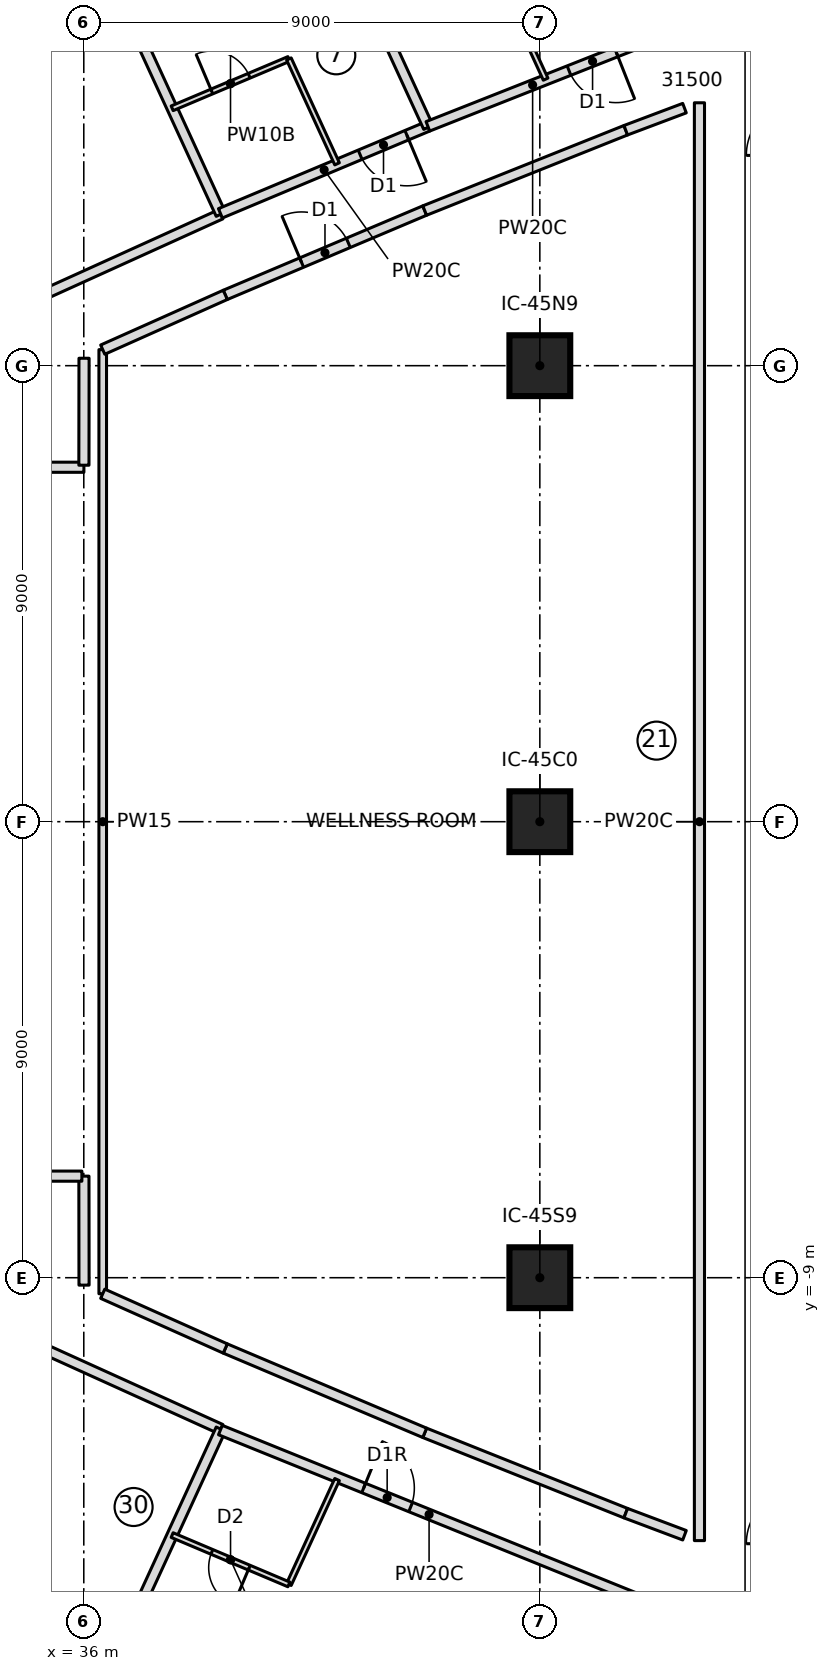
"""IFC4 building model, lengths in metres.
Left out: names, types, materials, properties, quantities, classifications, styles, units other than length and angle.
Written with IfcOpenShell. Run it as: python <this file> out.ifc"""

import sys

from ifc_helpers import new_model, si_unit, direction, frame, frame_2d, origin, origin_2d, place, context, subcontext, project, spatial, rectangle, extrude, element, fill, save


model = new_model("IFC4")
c1 = context("Model", 3, precision=1e-05, world=origin(), true_north=direction((0.0, 1.0)))
c2 = subcontext(c1, "Body", "Model", "MODEL_VIEW")
j1 = project(units=[si_unit("LENGTHUNIT", "METRE"), si_unit("PLANEANGLEUNIT", "RADIAN")], contexts=[c1])
p1 = place(None, origin())
s1 = spatial("IfcSite", under=j1, at=p1, CompositionType="ELEMENT")
p2 = place(p1, origin())
s2 = spatial("IfcBuilding", under=s1, at=p2, CompositionType="ELEMENT")
p3 = place(p2, frame((0.0, 0.0, 99.1)))
s3 = spatial("IfcBuildingStorey", under=s2, at=p3, CompositionType="ELEMENT", Elevation=99.1)
for number, where, z_axis, x_axis in (
    (1, (45.0, -9.0, 0.0), (0.0, 0.0, 1.0), (1.0, 0.0, 0.0)),
    (2, (45.0, 0.0, 0.0), (0.0, 0.0, 1.0), (1.0, 0.0, 0.0)),
    (3, (45.0, 9.0, 0.0), (0.0, 0.0, 1.0), (1.0, 0.0, 0.0)),
):
    element("IfcColumn", number, at=place(p3, frame(where, z_axis=z_axis, x_axis=x_axis)), inside=s3, PredefinedType="COLUMN", context=c2, shape_type="SweptSolid", body=[
        extrude(rectangle(XDim=1.2, YDim=1.2, at=origin_2d()), origin(), (0.0, 0.0, 1.0), 3.55),
    ])
p4 = place(p3, frame((30.614, 8.32, 0.0), z_axis=(0.0, 0.0, 1.0), x_axis=(0.910751030363, 0.41295588226, 0.0)))
e4 = element("IfcWall", 4, at=p4, inside=s3, PredefinedType="PARTITIONING", context=c2, shape_type="SweptSolid", body=[
    extrude(rectangle(XDim=8.883, YDim=0.2, at=frame_2d((4.442, 0.0))), origin(), (0.0, 0.0, 1.0), 3.25),
])
p5 = place(p4, frame((0.45, 0.0, 0.0)))
e5 = element("IfcOpeningElement", 5, at=p5, cuts=e4, PredefinedType="OPENING", context=c2, shape_type="SweptSolid", body=[
    extrude(rectangle(XDim=1.0, YDim=2.1, at=frame_2d((0.5, 1.05))), frame((0.0, 0.11, 0.0), z_axis=(0.0, -1.0, 0.0), x_axis=(1.0, 0.0, 0.0)), (0.0, 0.0, 1.0), 0.22),
])
p6 = place(p3, frame((38.704, 11.989, 0.0), z_axis=(0.0, 0.0, 1.0), x_axis=(-0.417416334044, 0.908715359215, 0.0)))
e6 = element("IfcWall", 6, at=p6, inside=s3, PredefinedType="PARTITIONING", context=c2, shape_type="SweptSolid", body=[
    extrude(rectangle(XDim=7.604, YDim=0.2, at=frame_2d((3.802, 0.0))), origin(), (0.0, 0.0, 1.0), 3.25),
])
p7 = place(p3, frame((42.791, 13.724, 0.0), z_axis=(0.0, 0.0, 1.0), x_axis=(-0.922230433067, -0.386640696675, 0.0)))
e7 = element("IfcWall", 7, at=p7, inside=s3, PredefinedType="PARTITIONING", context=c2, shape_type="SweptSolid", body=[
    extrude(rectangle(XDim=4.44, YDim=0.2, at=frame_2d((2.22, 0.0))), origin(), (0.0, 0.0, 1.0), 3.25),
])
p8 = place(p7, frame((0.45, 0.0, 0.0)))
e8 = element("IfcOpeningElement", 8, at=p8, cuts=e7, PredefinedType="OPENING", context=c2, shape_type="SweptSolid", body=[
    extrude(rectangle(XDim=1.0, YDim=2.1, at=frame_2d((0.5, 1.05))), frame((0.0, 0.11, 0.0), z_axis=(0.0, -1.0, 0.0), x_axis=(1.0, 0.0, 0.0)), (0.0, 0.0, 1.0), 0.22),
])
p9 = place(p3, frame((37.744, 14.08, 0.0), z_axis=(0.0, 0.0, 1.0), x_axis=(0.921042675983, 0.38946166566, 0.0)))
e9 = element("IfcWall", 9, at=p9, inside=s3, PredefinedType="PARTITIONING", context=c2, shape_type="SweptSolid", body=[
    extrude(rectangle(XDim=2.501, YDim=0.1, at=frame_2d((1.25, 0.0))), origin(), (0.0, 0.0, 1.0), 3.25),
])
p10 = place(p9, frame((0.85, 0.0, 0.0)))
e10 = element("IfcOpeningElement", 10, at=p10, cuts=e9, PredefinedType="OPENING", context=c2, shape_type="SweptSolid", body=[
    extrude(rectangle(XDim=0.8, YDim=2.1, at=frame_2d((0.4, 1.05))), frame((0.0, 0.06, 0.0), z_axis=(0.0, -1.0, 0.0), x_axis=(1.0, 0.0, 0.0)), (0.0, 0.0, 1.0), 0.12),
])
p11 = place(p3, frame((40.048, 15.054, 0.0), z_axis=(0.0, 0.0, 1.0), x_axis=(0.417433204355, -0.908707609686, 0.0)))
e11 = element("IfcWall", 11, at=p11, inside=s3, PredefinedType="PARTITIONING", context=c2, shape_type="SweptSolid", body=[
    extrude(rectangle(XDim=2.278, YDim=0.1, at=frame_2d((1.139, 0.0))), origin(), (0.0, 0.0, 1.0), 3.25),
])
p12 = place(p3, frame((42.799, 13.705, 0.0), z_axis=(0.0, 0.0, 1.0), x_axis=(-0.417427858403, 0.908710065438, 0.0)))
e12 = element("IfcWall", 12, at=p12, inside=s3, PredefinedType="PARTITIONING", context=c2, shape_type="SweptSolid", body=[
    extrude(rectangle(XDim=7.61, YDim=0.2, at=frame_2d((3.805, 0.0))), origin(), (0.0, 0.0, 1.0), 3.25),
])
p13 = place(p3, frame((46.924, 15.357, 0.0), z_axis=(0.0, 0.0, 1.0), x_axis=(-0.930040633249, -0.367456692014, 0.0)))
e13 = element("IfcWall", 13, at=p13, inside=s3, PredefinedType="PARTITIONING", context=c2, shape_type="SweptSolid", body=[
    extrude(rectangle(XDim=4.444, YDim=0.2, at=frame_2d((2.222, 0.0))), origin(), (0.0, 0.0, 1.0), 3.25),
])
p14 = place(p13, frame((0.45, 0.0, 0.0)))
e14 = element("IfcOpeningElement", 14, at=p14, cuts=e13, PredefinedType="OPENING", context=c2, shape_type="SweptSolid", body=[
    extrude(rectangle(XDim=1.0, YDim=2.1, at=frame_2d((0.5, 1.05))), frame((0.0, 0.11, 0.0), z_axis=(0.0, -1.0, 0.0), x_axis=(1.0, 0.0, 0.0)), (0.0, 0.0, 1.0), 0.22),
])
p15 = place(p3, frame((44.163, 16.727, 0.0), z_axis=(0.0, 0.0, 1.0), x_axis=(0.417373525971, -0.908735021785, 0.0)))
e15 = element("IfcWall", 15, at=p15, inside=s3, PredefinedType="PARTITIONING", context=c2, shape_type="SweptSolid", body=[
    extrude(rectangle(XDim=2.28, YDim=0.1, at=frame_2d((1.14, 0.0))), origin(), (0.0, 0.0, 1.0), 3.25),
])
p16 = place(p3, frame((30.614, -8.32, 0.0), z_axis=(0.0, 0.0, 1.0), x_axis=(0.910751030363, -0.41295588226, 0.0)))
e16 = element("IfcWall", 16, at=p16, inside=s3, PredefinedType="PARTITIONING", context=c2, shape_type="SweptSolid", body=[
    extrude(rectangle(XDim=8.883, YDim=0.2, at=frame_2d((4.442, 0.0))), origin(), (0.0, 0.0, 1.0), 3.25),
])
p17 = place(p16, frame((0.45, 0.0, 0.0)))
e17 = element("IfcOpeningElement", 17, at=p17, cuts=e16, PredefinedType="OPENING", context=c2, shape_type="SweptSolid", body=[
    extrude(rectangle(XDim=1.0, YDim=2.1, at=frame_2d((0.5, 1.05))), frame((0.0, 0.11, 0.0), z_axis=(0.0, -1.0, 0.0), x_axis=(1.0, 0.0, 0.0)), (0.0, 0.0, 1.0), 0.22),
])
p18 = place(p3, frame((35.531, -18.898, 0.0), z_axis=(0.0, 0.0, 1.0), x_axis=(0.417416334044, 0.908715359215, 0.0)))
e18 = element("IfcWall", 18, at=p18, inside=s3, PredefinedType="PARTITIONING", context=c2, shape_type="SweptSolid", body=[
    extrude(rectangle(XDim=7.604, YDim=0.2, at=frame_2d((3.802, 0.0))), origin(), (0.0, 0.0, 1.0), 3.25),
])
p19 = place(p3, frame((38.696, -12.007, 0.0), z_axis=(0.0, 0.0, 1.0), x_axis=(0.927027566285, -0.374993188401, 0.0)))
e19 = element("IfcWall", 19, at=p19, inside=s3, PredefinedType="PARTITIONING", context=c2, shape_type="SweptSolid", body=[
    extrude(rectangle(XDim=8.885, YDim=0.2, at=frame_2d((4.442, 0.0))), origin(), (0.0, 0.0, 1.0), 3.25),
])
p20 = place(p19, frame((3.05, 0.0, 0.0)))
e20 = element("IfcOpeningElement", 20, at=p20, cuts=e19, PredefinedType="OPENING", context=c2, shape_type="SweptSolid", body=[
    extrude(rectangle(XDim=1.0, YDim=2.1, at=frame_2d((0.5, 1.05))), frame((0.0, 0.11, 0.0), z_axis=(0.0, -1.0, 0.0), x_axis=(1.0, 0.0, 0.0)), (0.0, 0.0, 1.0), 0.22),
])
p21 = place(p3, frame((40.999, -12.984, 0.0), z_axis=(0.0, 0.0, 1.0), x_axis=(-0.417433204355, -0.908707609686, 0.0)))
e21 = element("IfcWall", 21, at=p21, inside=s3, PredefinedType="PARTITIONING", context=c2, shape_type="SweptSolid", body=[
    extrude(rectangle(XDim=2.278, YDim=0.1, at=frame_2d((1.139, 0.0))), origin(), (0.0, 0.0, 1.0), 3.25),
])
p22 = place(p3, frame((40.048, -15.054, 0.0), z_axis=(0.0, 0.0, 1.0), x_axis=(-0.921042675983, 0.38946166566, 0.0)))
e22 = element("IfcWall", 22, at=p22, inside=s3, PredefinedType="PARTITIONING", context=c2, shape_type="SweptSolid", body=[
    extrude(rectangle(XDim=2.501, YDim=0.1, at=frame_2d((1.25, 0.0))), origin(), (0.0, 0.0, 1.0), 3.25),
])
p23 = place(p22, frame((0.85, 0.0, 0.0)))
e23 = element("IfcOpeningElement", 23, at=p23, cuts=e22, PredefinedType="OPENING", context=c2, shape_type="SweptSolid", body=[
    extrude(rectangle(XDim=0.8, YDim=2.1, at=frame_2d((0.4, 1.05))), frame((0.0, 0.06, 0.0), z_axis=(0.0, -1.0, 0.0), x_axis=(1.0, 0.0, 0.0)), (0.0, 0.0, 1.0), 0.12),
])
p24 = place(p3, frame((36.374, -9.317, 0.0), z_axis=(0.0, 0.0, 1.0), x_axis=(0.0, 1.0, 0.0)))
e24 = element("IfcWall", 24, at=p24, inside=s3, PredefinedType="PARTITIONING", context=c2, shape_type="SweptSolid", body=[
    extrude(rectangle(XDim=18.634, YDim=0.15, at=frame_2d((9.317, 0.0))), origin(), (0.0, 0.0, 1.0), 3.25),
])
p25 = place(p3, frame((38.792, 10.397, 0.0), z_axis=(0.0, 0.0, 1.0), x_axis=(0.921037415532, 0.389474105929, 0.0)))
e25 = element("IfcWall", 25, at=p25, inside=s3, PredefinedType="PARTITIONING", context=c2, shape_type="SweptSolid", body=[
    extrude(rectangle(XDim=4.273, YDim=0.2, at=frame_2d((2.137, 0.0))), origin(), (0.0, 0.0, 1.0), 3.25),
])
p26 = place(p25, frame((1.636, 0.0, 0.0)))
e26 = element("IfcOpeningElement", 26, at=p26, cuts=e25, PredefinedType="OPENING", context=c2, shape_type="SweptSolid", body=[
    extrude(rectangle(XDim=1.0, YDim=2.1, at=frame_2d((0.5, 1.05))), frame((0.0, 0.11, 0.0), z_axis=(0.0, -1.0, 0.0), x_axis=(1.0, 0.0, 0.0)), (0.0, 0.0, 1.0), 0.22),
])
for number, where, z_axis, x_axis in (
    (27, (42.728, 12.062, 0.0), (0.0, 0.0, 1.0), (0.929, 0.371, 0.0)),
    (28, (46.696, -13.647, 0.0), (0.0, 0.0, 1.0), (-0.929, 0.371, 0.0)),
):
    element("IfcWall", number, at=place(p3, frame(where, z_axis=z_axis, x_axis=x_axis)), inside=s3, PredefinedType="PARTITIONING", context=c2, shape_type="SweptSolid", body=[
        extrude(rectangle(XDim=4.273, YDim=0.2, at=frame_2d((2.136, 0.0))), origin(), (0.0, 0.0, 1.0), 3.25),
    ])
p27 = place(p3, frame((42.728, -12.062, 0.0), z_axis=(0.0, 0.0, 1.0), x_axis=(-0.921037415532, 0.389474105929, 0.0)))
e29 = element("IfcWall", 29, at=p27, inside=s3, PredefinedType="PARTITIONING", context=c2, shape_type="SweptSolid", body=[
    extrude(rectangle(XDim=4.273, YDim=0.2, at=frame_2d((2.137, 0.0))), origin(), (0.0, 0.0, 1.0), 3.25),
])
for number, where, z_axis, x_axis in (
    (30, (38.792, -10.397, 0.0), (0.0, 0.0, 1.0), (-0.913, 0.408, 0.0)),
    (31, (36.374, 9.317, 0.0), (0.0, 0.0, 1.0), (0.913, 0.408, 0.0)),
):
    element("IfcWall", number, at=place(p3, frame(where, z_axis=z_axis, x_axis=x_axis)), inside=s3, PredefinedType="PARTITIONING", context=c2, shape_type="SweptSolid", body=[
        extrude(rectangle(XDim=2.648, YDim=0.2, at=frame_2d((1.324, 0.0))), origin(), (0.0, 0.0, 1.0), 3.25),
    ])
for number, where, z_axis, x_axis in (
    (32, (46.696, 13.647, 0.0), (0.0, 0.0, 1.0), (0.936, 0.352, 0.0)),
    (33, (47.855, -14.083, 0.0), (0.0, 0.0, 1.0), (-0.936, 0.352, 0.0)),
):
    element("IfcWall", number, at=place(p3, frame(where, z_axis=z_axis, x_axis=x_axis)), inside=s3, PredefinedType="PARTITIONING", context=c2, shape_type="SweptSolid", body=[
        extrude(rectangle(XDim=1.239, YDim=0.2, at=frame_2d((0.619, 0.0))), origin(), (0.0, 0.0, 1.0), 3.25),
    ])
p28 = place(p3, frame((36.005, -9.146, 0.0), z_axis=(0.0, 0.0, 1.0), x_axis=(-0.001135073049, 0.999999355804, 0.0)))
e34 = element("IfcWall", 34, at=p28, inside=s3, PredefinedType="PARTITIONING", context=c2, shape_type="SweptSolid", body=[
    extrude(rectangle(XDim=2.151, YDim=0.2, at=frame_2d((1.075, 0.0))), origin(), (0.0, 0.0, 1.0), 3.25),
])
p29 = place(p3, frame((35.962, -6.996, 0.0), z_axis=(0.0, 0.0, 1.0), x_axis=(-0.999999992409, 0.000123213405, 0.0)))
e35 = element("IfcWall", 35, at=p29, inside=s3, PredefinedType="PARTITIONING", context=c2, shape_type="SweptSolid", body=[
    extrude(rectangle(XDim=3.963, YDim=0.2, at=frame_2d((1.981, 0.0))), origin(), (0.0, 0.0, 1.0), 3.25),
])
p30 = place(p3, frame((32.0, 6.995, 0.0), z_axis=(0.0, 0.0, 1.0), x_axis=(0.99999999256, 0.00012198097, 0.0)))
e36 = element("IfcWall", 36, at=p30, inside=s3, PredefinedType="PARTITIONING", context=c2, shape_type="SweptSolid", body=[
    extrude(rectangle(XDim=4.003, YDim=0.2, at=frame_2d((2.001, 0.0))), origin(), (0.0, 0.0, 1.0), 3.25),
])
p31 = place(p3, frame((36.002, 7.036, 0.0), z_axis=(0.0, 0.0, 1.0), x_axis=(0.001156603436, 0.999999331134, 0.0)))
e37 = element("IfcWall", 37, at=p31, inside=s3, PredefinedType="PARTITIONING", context=c2, shape_type="SweptSolid", body=[
    extrude(rectangle(XDim=2.111, YDim=0.2, at=frame_2d((1.055, 0.0))), origin(), (0.0, 0.0, 1.0), 3.25),
])
p32 = place(p3, frame((48.15, 14.189, 0.0), z_axis=(0.0, 0.0, 1.0), x_axis=(0.0, -1.0, 0.0)))
e38 = element("IfcWall", 38, at=p32, inside=s3, PredefinedType="PARTITIONING", context=c2, shape_type="SweptSolid", body=[
    extrude(rectangle(XDim=28.377, YDim=0.2, at=frame_2d((14.189, 0.0))), origin(), (0.0, 0.0, 1.0), 3.25),
])
p33 = place(p10, origin())
e39 = element("IfcDoor", 39, at=p33, inside=s3, OperationType="SINGLE_SWING_LEFT", PredefinedType="DOOR", context=c2, shape_type="SweptSolid", body=[
    extrude(rectangle(XDim=0.8, YDim=2.1, at=frame_2d((0.4, 1.05))), frame((0.0, 0.025, 0.0), z_axis=(0.0, -1.0, 0.0), x_axis=(1.0, 0.0, 0.0)), (0.0, 0.0, 1.0), 0.05),
])
fill(e10, e39)
p34 = place(p8, origin())
e40 = element("IfcDoor", 40, at=p34, inside=s3, OperationType="SINGLE_SWING_LEFT", PredefinedType="DOOR", context=c2, shape_type="SweptSolid", body=[
    extrude(rectangle(XDim=1.0, YDim=2.1, at=frame_2d((0.5, 1.05))), frame((0.0, 0.025, 0.0), z_axis=(0.0, -1.0, 0.0), x_axis=(1.0, 0.0, 0.0)), (0.0, 0.0, 1.0), 0.05),
])
fill(e8, e40)
p35 = place(p14, origin())
e41 = element("IfcDoor", 41, at=p35, inside=s3, OperationType="SINGLE_SWING_LEFT", PredefinedType="DOOR", context=c2, shape_type="SweptSolid", body=[
    extrude(rectangle(XDim=1.0, YDim=2.1, at=frame_2d((0.5, 1.05))), frame((0.0, 0.025, 0.0), z_axis=(0.0, -1.0, 0.0), x_axis=(1.0, 0.0, 0.0)), (0.0, 0.0, 1.0), 0.05),
])
fill(e14, e41)
p36 = place(p23, origin())
e42 = element("IfcDoor", 42, at=p36, inside=s3, OperationType="SINGLE_SWING_LEFT", PredefinedType="DOOR", context=c2, shape_type="SweptSolid", body=[
    extrude(rectangle(XDim=0.8, YDim=2.1, at=frame_2d((0.4, 1.05))), frame((0.0, 0.025, 0.0), z_axis=(0.0, -1.0, 0.0), x_axis=(1.0, 0.0, 0.0)), (0.0, 0.0, 1.0), 0.05),
])
fill(e23, e42)
p37 = place(p20, origin())
e43 = element("IfcDoor", 43, at=p37, inside=s3, OperationType="SINGLE_SWING_RIGHT", PredefinedType="DOOR", context=c2, shape_type="SweptSolid", body=[
    extrude(rectangle(XDim=1.0, YDim=2.1, at=frame_2d((0.5, 1.05))), frame((0.0, 0.025, 0.0), z_axis=(0.0, -1.0, 0.0), x_axis=(1.0, 0.0, 0.0)), (0.0, 0.0, 1.0), 0.05),
])
fill(e20, e43)
p38 = place(p26, origin())
e44 = element("IfcDoor", 44, at=p38, inside=s3, OperationType="SINGLE_SWING_LEFT", PredefinedType="DOOR", context=c2, shape_type="SweptSolid", body=[
    extrude(rectangle(XDim=1.0, YDim=2.1, at=frame_2d((0.5, 1.05))), frame((0.0, 0.025, 0.0), z_axis=(0.0, -1.0, 0.0), x_axis=(1.0, 0.0, 0.0)), (0.0, 0.0, 1.0), 0.05),
])
fill(e26, e44)
save(model, sys.argv[1])
